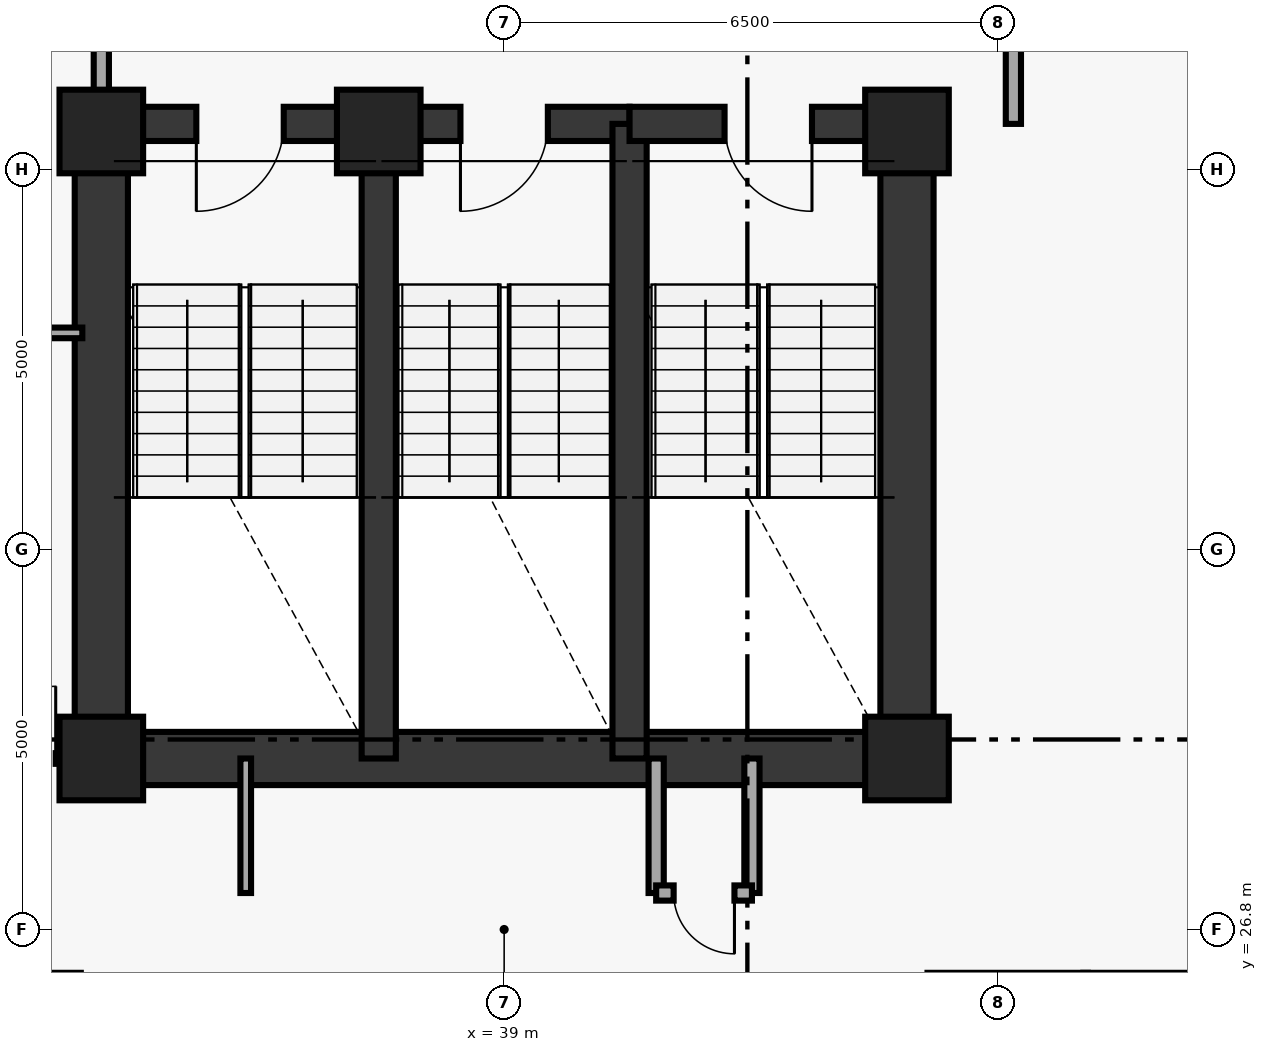
"""IFC4 building model, lengths in metres.
Left out: names, types, materials, properties, quantities, classifications, styles, units other than length and angle.
Written with IfcOpenShell. Run it as: python <this file> out.ifc"""

import sys

from ifc_helpers import new_model, si_unit, direction, frame, frame_2d, origin, origin_2d, place, context, subcontext, project, spatial, rectangle, extrude, element, fill, save


model = new_model("IFC4")
c1 = context("Model", 3, precision=1e-05, world=origin(), true_north=direction((0.0, 1.0)))
c2 = subcontext(c1, "Body", "Model", "MODEL_VIEW")
j1 = project(units=[si_unit("LENGTHUNIT", "METRE"), si_unit("PLANEANGLEUNIT", "RADIAN")], contexts=[c1])
p1 = place(None, origin())
s1 = spatial("IfcSite", under=j1, at=p1, CompositionType="ELEMENT")
p2 = place(p1, origin())
s2 = spatial("IfcBuilding", under=s1, at=p2, CompositionType="ELEMENT")
p3 = place(p2, frame((0.0, 0.0, 106.05)))
s3 = spatial("IfcBuildingStorey", under=s2, at=p3, CompositionType="ELEMENT", Elevation=106.05)
for number, where, z_axis, x_axis in (
    (1, (44.3, 29.05, 0.0), (0.0, 0.0, 1.0), (1.0, 0.0, 0.0)),
    (2, (44.3, 37.3, 0.0), (0.0, 0.0, 1.0), (1.0, 0.0, 0.0)),
    (3, (37.35, 37.3, 0.0), (0.0, 0.0, 1.0), (1.0, 0.0, 0.0)),
    (4, (33.7, 37.3, 0.0), (0.0, 0.0, 1.0), (1.0, 0.0, 0.0)),
    (5, (33.7, 29.05, 0.0), (0.0, 0.0, 1.0), (1.0, 0.0, 0.0)),
):
    element("IfcColumn", number, at=place(p3, frame(where, z_axis=z_axis, x_axis=x_axis)), inside=s3, PredefinedType="PILASTER", context=c2, shape_type="SweptSolid", body=[
        extrude(rectangle(XDim=1.1, YDim=1.1, at=origin_2d()), origin(), (0.0, 0.0, 1.0), 6.88),
    ])
for number, where, z_axis, x_axis in (
    (6, (33.7, 29.05, 0.0), (0.0, 0.0, 1.0), (0.0, 1.0, 0.0)),
    (7, (44.3, 29.05, 0.0), (0.0, 0.0, 1.0), (0.0, 1.0, 0.0)),
):
    element("IfcWall", number, at=place(p3, frame(where, z_axis=z_axis, x_axis=x_axis)), inside=s3, PredefinedType="SHEAR", context=c2, shape_type="SweptSolid", body=[
        extrude(rectangle(XDim=8.35, YDim=0.7, at=frame_2d((4.175, 0.0))), origin(), (0.0, 0.0, 1.0), 6.88),
    ])
p4 = place(p3, frame((33.7, 29.05, 0.0), z_axis=(0.0, 0.0, 1.0), x_axis=(1.0, 0.0, 0.0)))
e8 = element("IfcWall", 8, at=p4, inside=s3, PredefinedType="SHEAR", context=c2, shape_type="SweptSolid", body=[
    extrude(rectangle(XDim=10.6, YDim=0.7, at=frame_2d((5.3, 0.0))), origin(), (0.0, 0.0, 1.0), 6.88),
])
p5 = place(p3, frame((37.35, 37.4, 0.0), z_axis=(0.0, 0.0, 1.0), x_axis=(-1.0, 0.0, 0.0)))
e9 = element("IfcWall", 9, at=p5, inside=s3, PredefinedType="SHEAR", context=c2, shape_type="SweptSolid", body=[
    extrude(rectangle(XDim=3.65, YDim=0.45, at=frame_2d((1.825, 0.0))), origin(), (0.0, 0.0, 1.0), 6.88),
])
p6 = place(p5, frame((1.25, 0.0, 0.0)))
e10 = element("IfcOpeningElement", 10, at=p6, cuts=e9, PredefinedType="OPENING", context=c2, shape_type="SweptSolid", body=[
    extrude(rectangle(XDim=1.15, YDim=2.15, at=frame_2d((0.575, 1.075))), frame((0.0, 0.235, 0.0), z_axis=(0.0, -1.0, 0.0), x_axis=(1.0, 0.0, 0.0)), (0.0, 0.0, 1.0), 0.47),
])
p7 = place(p3, frame((37.35, 29.05, 0.0), z_axis=(0.0, 0.0, 1.0), x_axis=(0.0, 1.0, 0.0)))
e11 = element("IfcWall", 11, at=p7, inside=s3, PredefinedType="SHEAR", context=c2, shape_type="SweptSolid", body=[
    extrude(rectangle(XDim=8.35, YDim=0.45, at=frame_2d((4.175, 0.0))), origin(), (0.0, 0.0, 1.0), 6.88),
])
p8 = place(p3, frame((40.65, 37.4, 0.0), z_axis=(0.0, 0.0, 1.0), x_axis=(-1.0, 0.0, 0.0)))
e12 = element("IfcWall", 12, at=p8, inside=s3, PredefinedType="SHEAR", context=c2, shape_type="SweptSolid", body=[
    extrude(rectangle(XDim=3.3, YDim=0.45, at=frame_2d((1.65, 0.0))), origin(), (0.0, 0.0, 1.0), 6.88),
])
p9 = place(p8, frame((1.075, 0.0, 0.0)))
e13 = element("IfcOpeningElement", 13, at=p9, cuts=e12, PredefinedType="OPENING", context=c2, shape_type="SweptSolid", body=[
    extrude(rectangle(XDim=1.15, YDim=2.15, at=frame_2d((0.575, 1.075))), frame((0.0, 0.235, 0.0), z_axis=(0.0, -1.0, 0.0), x_axis=(1.0, 0.0, 0.0)), (0.0, 0.0, 1.0), 0.47),
])
p10 = place(p3, frame((40.65, 29.05, 0.0), z_axis=(0.0, 0.0, 1.0), x_axis=(0.0, 1.0, 0.0)))
e14 = element("IfcWall", 14, at=p10, inside=s3, PredefinedType="SHEAR", context=c2, shape_type="SweptSolid", body=[
    extrude(rectangle(XDim=8.35, YDim=0.45, at=frame_2d((4.175, 0.0))), origin(), (0.0, 0.0, 1.0), 6.88),
])
p11 = place(p3, frame((44.3, 37.4, 0.0), z_axis=(0.0, 0.0, 1.0), x_axis=(-1.0, 0.0, 0.0)))
e15 = element("IfcWall", 15, at=p11, inside=s3, PredefinedType="SHEAR", context=c2, shape_type="SweptSolid", body=[
    extrude(rectangle(XDim=3.65, YDim=0.45, at=frame_2d((1.825, 0.0))), origin(), (0.0, 0.0, 1.0), 6.88),
])
p12 = place(p11, frame((1.25, 0.0, 0.0)))
e16 = element("IfcOpeningElement", 16, at=p12, cuts=e15, PredefinedType="OPENING", context=c2, shape_type="SweptSolid", body=[
    extrude(rectangle(XDim=1.15, YDim=2.15, at=frame_2d((0.575, 1.075))), frame((0.0, 0.235, 0.0), z_axis=(0.0, -1.0, 0.0), x_axis=(1.0, 0.0, 0.0)), (0.0, 0.0, 1.0), 0.47),
])
for number, where, z_axis, x_axis in (
    (17, (33.7, 37.4, 0.0), (0.0, 0.0, 1.0), (0.0, 1.0, 0.0)),
    (18, (45.7, 37.4, 0.0), (0.0, 0.0, 1.0), (0.0, 1.0, 0.0)),
):
    element("IfcWall", number, at=place(p3, frame(where, z_axis=z_axis, x_axis=x_axis)), inside=s3, PredefinedType="SOLIDWALL", context=c2, shape_type="SweptSolid", body=[
        extrude(rectangle(XDim=1.88, YDim=0.2, at=frame_2d((0.94, 0.0))), origin(), (0.0, 0.0, 1.0), 6.88),
    ])
p13 = place(p3, frame((35.6, 27.28, 0.0), z_axis=(0.0, 0.0, 1.0), x_axis=(0.0, 1.0, 0.0)))
e19 = element("IfcWall", 19, at=p13, inside=s3, PredefinedType="PARTITIONING", context=c2, shape_type="SweptSolid", body=[
    extrude(rectangle(XDim=1.77, YDim=0.14, at=frame_2d((0.885, 0.0))), origin(), (0.0, 0.0, 1.0), 6.88),
])
for number, where, z_axis, x_axis in (
    (20, (41.0, 27.28, 0.0), (0.0, 0.0, 1.0), (0.0, 1.0, 0.0)),
    (21, (42.26, 27.28, 0.0), (0.0, 0.0, 1.0), (0.0, 1.0, 0.0)),
):
    element("IfcWall", number, at=place(p3, frame(where, z_axis=z_axis, x_axis=x_axis)), inside=s3, PredefinedType="SOLIDWALL", context=c2, shape_type="SweptSolid", body=[
        extrude(rectangle(XDim=1.77, YDim=0.2, at=frame_2d((0.885, 0.0))), origin(), (0.0, 0.0, 1.0), 6.88),
    ])
p14 = place(p3, frame((41.0, 27.28, 0.0), z_axis=(0.0, 0.0, 1.0), x_axis=(1.0, 0.0, 0.0)))
e22 = element("IfcWall", 22, at=p14, inside=s3, PredefinedType="SOLIDWALL", context=c2, shape_type="SweptSolid", body=[
    extrude(rectangle(XDim=1.26, YDim=0.2, at=frame_2d((0.63, 0.0))), origin(), (0.0, 0.0, 1.0), 6.88),
])
p15 = place(p14, frame((0.23, 0.0, 0.0)))
e23 = element("IfcOpeningElement", 23, at=p15, cuts=e22, PredefinedType="OPENING", context=c2, shape_type="SweptSolid", body=[
    extrude(rectangle(XDim=0.8, YDim=2.05, at=frame_2d((0.4, 1.025))), frame((0.0, 0.11, 0.0), z_axis=(0.0, -1.0, 0.0), x_axis=(1.0, 0.0, 0.0)), (0.0, 0.0, 1.0), 0.22),
])
p16 = place(p3, frame((30.85, 29.05, 0.0), z_axis=(0.0, 0.0, 1.0), x_axis=(1.0, 0.0, 0.0)))
e24 = element("IfcWall", 24, at=p16, inside=s3, PredefinedType="PARTITIONING", context=c2, shape_type="SweptSolid", body=[
    extrude(rectangle(XDim=2.43, YDim=0.14, at=frame_2d((1.215, 0.0))), origin(), (0.0, 0.0, 1.0), 4.88),
])
p17 = place(p16, frame((0.14, 0.0, 0.0)))
e25 = element("IfcOpeningElement", 25, at=p17, cuts=e24, PredefinedType="OPENING", context=c2, shape_type="SweptSolid", body=[
    extrude(rectangle(XDim=0.85, YDim=2.1, at=frame_2d((0.425, 1.05))), frame((0.0, 0.08, 0.0), z_axis=(0.0, -1.0, 0.0), x_axis=(1.0, 0.0, 0.0)), (0.0, 0.0, 1.0), 0.16),
])
p18 = place(p16, frame((1.3, 0.0, 0.0)))
e26 = element("IfcOpeningElement", 26, at=p18, cuts=e24, PredefinedType="OPENING", context=c2, shape_type="SweptSolid", body=[
    extrude(rectangle(XDim=0.95, YDim=2.1, at=frame_2d((0.475, 1.05))), frame((0.0, 0.08, 0.0), z_axis=(0.0, -1.0, 0.0), x_axis=(1.0, 0.0, 0.0)), (0.0, 0.0, 1.0), 0.16),
])
p19 = place(p3, frame((30.85, 34.65, 0.0), z_axis=(0.0, 0.0, 1.0), x_axis=(1.0, 0.0, 0.0)))
e27 = element("IfcWall", 27, at=p19, inside=s3, PredefinedType="PARTITIONING", context=c2, shape_type="SweptSolid", body=[
    extrude(rectangle(XDim=2.6, YDim=0.14, at=frame_2d((1.3, 0.0))), origin(), (0.0, 0.0, 1.0), 6.88),
])
p20 = place(p3, frame((51.552, 35.291, 0.0), z_axis=(0.0, 0.0, 1.0), x_axis=(-0.661421630005, 0.750014284772, 0.0)))
e28 = element("IfcWall", 28, at=p20, inside=s3, PredefinedType="PARTITIONING", context=c2, shape_type="SweptSolid", body=[
    extrude(rectangle(XDim=8.116, YDim=0.16, at=frame_2d((4.058, 0.0))), origin(), (0.0, 0.0, 1.0), 6.88),
])
p21 = place(p6, origin())
e29 = element("IfcDoor", 29, at=p21, inside=s3, OperationType="SINGLE_SWING_RIGHT", PredefinedType="DOOR", context=c2, shape_type="SweptSolid", body=[
    extrude(rectangle(XDim=1.15, YDim=2.15, at=frame_2d((0.575, 1.075))), frame((0.0, 0.025, 0.0), z_axis=(0.0, -1.0, 0.0), x_axis=(1.0, 0.0, 0.0)), (0.0, 0.0, 1.0), 0.05),
])
fill(e10, e29)
p22 = place(p9, origin())
e30 = element("IfcDoor", 30, at=p22, inside=s3, OperationType="SINGLE_SWING_RIGHT", PredefinedType="DOOR", context=c2, shape_type="SweptSolid", body=[
    extrude(rectangle(XDim=1.15, YDim=2.15, at=frame_2d((0.575, 1.075))), frame((0.0, 0.025, 0.0), z_axis=(0.0, -1.0, 0.0), x_axis=(1.0, 0.0, 0.0)), (0.0, 0.0, 1.0), 0.05),
])
fill(e13, e30)
p23 = place(p12, origin())
e31 = element("IfcDoor", 31, at=p23, inside=s3, OperationType="SINGLE_SWING_LEFT", PredefinedType="DOOR", context=c2, shape_type="SweptSolid", body=[
    extrude(rectangle(XDim=1.15, YDim=2.15, at=frame_2d((0.575, 1.075))), frame((0.0, 0.025, 0.0), z_axis=(0.0, -1.0, 0.0), x_axis=(1.0, 0.0, 0.0)), (0.0, 0.0, 1.0), 0.05),
])
fill(e16, e31)
p24 = place(p15, origin())
e32 = element("IfcDoor", 32, at=p24, inside=s3, OperationType="SINGLE_SWING_RIGHT", PredefinedType="DOOR", context=c2, shape_type="SweptSolid", body=[
    extrude(rectangle(XDim=0.8, YDim=2.05, at=frame_2d((0.4, 1.025))), frame((0.0, 0.025, 0.0), z_axis=(0.0, -1.0, 0.0), x_axis=(1.0, 0.0, 0.0)), (0.0, 0.0, 1.0), 0.05),
])
fill(e23, e32)
p25 = place(p18, origin())
e33 = element("IfcDoor", 33, at=p25, inside=s3, OperationType="SINGLE_SWING_RIGHT", PredefinedType="DOOR", context=c2, shape_type="SweptSolid", body=[
    extrude(rectangle(XDim=0.95, YDim=2.1, at=frame_2d((0.475, 1.05))), frame((0.0, 0.025, 0.0), z_axis=(0.0, -1.0, 0.0), x_axis=(1.0, 0.0, 0.0)), (0.0, 0.0, 1.0), 0.05),
])
fill(e26, e33)
save(model, sys.argv[1])
